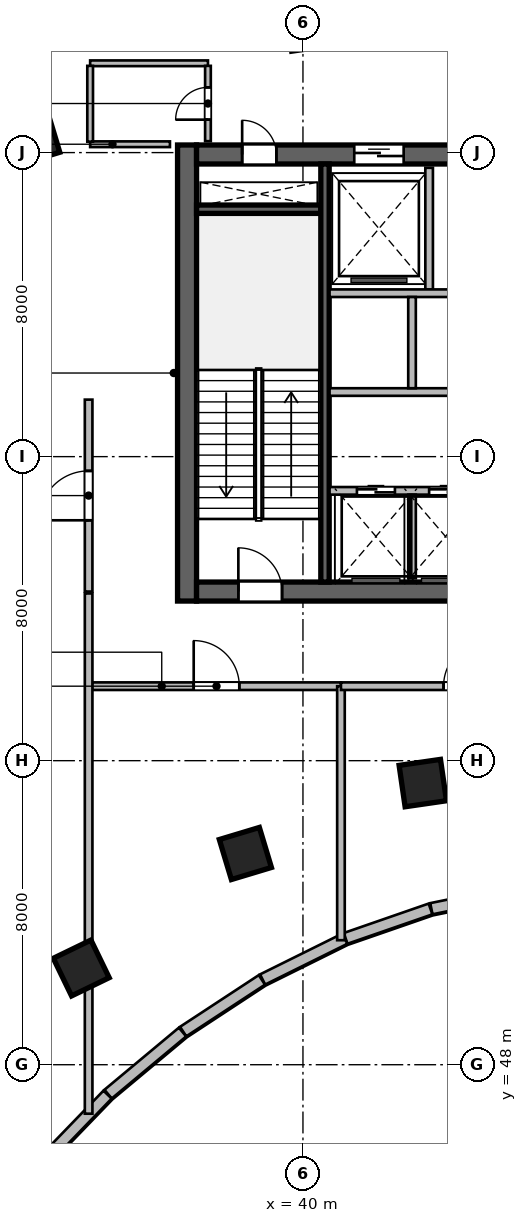
"""IFC4 building model, lengths in metres.
Left out: names, types, materials, properties, quantities, classifications, styles, units other than length and angle.
Written with IfcOpenShell. Run it as: python <this file> out.ifc"""

import sys

from ifc_helpers import new_model, si_unit, direction, frame, frame_2d, origin, origin_2d, place, context, subcontext, project, spatial, rectangle, extrude, source, transform, mapped, element, fill, save


model = new_model("IFC4")
c1 = context("Model", 3, precision=1e-05, world=origin(), true_north=direction((0.0, 1.0)))
c2 = subcontext(c1, "Body", "Model", "MODEL_VIEW")
j1 = project(units=[si_unit("LENGTHUNIT", "METRE"), si_unit("PLANEANGLEUNIT", "RADIAN")], contexts=[c1])
p1 = place(None, origin())
s1 = spatial("IfcSite", under=j1, at=p1, CompositionType="ELEMENT")
p2 = place(p1, origin())
s2 = spatial("IfcBuilding", under=s1, at=p2, CompositionType="ELEMENT")
p3 = place(p2, frame((0.0, 0.0, 85.8)))
s3 = spatial("IfcBuildingStorey", under=s2, at=p3, CompositionType="ELEMENT", Elevation=85.8)
m1 = source(origin(), c2, "Body", "SweptSolid", [
    extrude(rectangle(XDim=12.0, YDim=0.5, at=frame_2d((6.0, 0.0))), origin(), (0.0, 0.0, 1.0), 5.4),
])
p4 = place(p3, frame((36.95, 60.2, 0.0), z_axis=(0.0, 0.0, 1.0), x_axis=(0.0, 1.0, 0.0)))
e1 = element("IfcWall", 1, at=p4, inside=s3, PredefinedType="SHEAR", context=c2, shape_type="MappedRepresentation", body=[
    mapped(m1, transform((0.0, 0.0, 0.0), scale=1.0)),
])
m2 = source(origin(), c2, "Body", "SweptSolid", [
    extrude(rectangle(XDim=21.6, YDim=0.5, at=frame_2d((10.8, 0.0))), origin(), (0.0, 0.0, 1.0), 5.4),
])
p5 = place(p3, frame((37.2, 60.45, 0.0), z_axis=(0.0, 0.0, 1.0), x_axis=(1.0, 0.0, 0.0)))
e2 = element("IfcWall", 2, at=p5, inside=s3, PredefinedType="SHEAR", context=c2, shape_type="MappedRepresentation", body=[
    mapped(m2, transform((0.0, 0.0, 0.0), scale=1.0)),
])
p6 = place(p5, frame((1.1, 0.0, 0.0)))
e3 = element("IfcOpeningElement", 3, at=p6, cuts=e2, PredefinedType="OPENING", context=c2, shape_type="SweptSolid", body=[
    extrude(rectangle(XDim=1.15, YDim=2.15, at=frame_2d((0.575, 1.075))), frame((0.0, 0.26, 0.0), z_axis=(0.0, -1.0, 0.0), x_axis=(1.0, 0.0, 0.0)), (0.0, 0.0, 1.0), 0.52),
])
p7 = place(p5, frame((19.5, 0.0, 0.0)))
e4 = element("IfcOpeningElement", 4, at=p7, cuts=e2, PredefinedType="OPENING", context=c2, shape_type="SweptSolid", body=[
    extrude(rectangle(XDim=0.9, YDim=2.1, at=frame_2d((0.45, 1.05))), frame((0.0, 0.26, 0.0), z_axis=(0.0, -1.0, 0.0), x_axis=(1.0, 0.0, 0.0)), (0.0, 0.0, 1.0), 0.52),
])
p8 = place(p5, frame((12.02, 0.0, 0.0)))
e5 = element("IfcOpeningElement", 5, at=p8, cuts=e2, PredefinedType="OPENING", context=c2, shape_type="SweptSolid", body=[
    extrude(rectangle(XDim=1.6, YDim=2.15, at=frame_2d((0.8, 1.075))), frame((0.0, 0.26, 0.0), z_axis=(0.0, -1.0, 0.0), x_axis=(1.0, 0.0, 0.0)), (0.0, 0.0, 1.0), 0.52),
])
p9 = place(p3, frame((37.2, 71.95, 0.0), z_axis=(0.0, 0.0, 1.0), x_axis=(1.0, 0.0, 0.0)))
e6 = element("IfcWall", 6, at=p9, inside=s3, PredefinedType="SHEAR", context=c2, shape_type="MappedRepresentation", body=[
    mapped(m2, transform((0.0, 0.0, 0.0), scale=1.0)),
])
p10 = place(p9, frame((1.2, 0.0, 0.0)))
e7 = element("IfcOpeningElement", 7, at=p10, cuts=e6, PredefinedType="OPENING", context=c2, shape_type="SweptSolid", body=[
    extrude(rectangle(XDim=0.9, YDim=2.1, at=frame_2d((0.45, 1.05))), frame((0.0, 0.26, 0.0), z_axis=(0.0, -1.0, 0.0), x_axis=(1.0, 0.0, 0.0)), (0.0, 0.0, 1.0), 0.52),
])
p11 = place(p9, frame((14.7, 0.0, 0.0)))
e8 = element("IfcOpeningElement", 8, at=p11, cuts=e6, PredefinedType="OPENING", context=c2, shape_type="SweptSolid", body=[
    extrude(rectangle(XDim=1.2, YDim=2.15, at=frame_2d((0.6, 1.075))), frame((0.0, 0.26, 0.0), z_axis=(0.0, -1.0, 0.0), x_axis=(1.0, 0.0, 0.0)), (0.0, 0.0, 1.0), 0.52),
])
p12 = place(p9, frame((4.15, 0.0, 0.0)))
e9 = element("IfcOpeningElement", 9, at=p12, cuts=e6, PredefinedType="OPENING", context=c2, shape_type="SweptSolid", body=[
    extrude(rectangle(XDim=1.3, YDim=2.15, at=frame_2d((0.65, 1.075))), frame((0.0, 0.26, 0.0), z_axis=(0.0, -1.0, 0.0), x_axis=(1.0, 0.0, 0.0)), (0.0, 0.0, 1.0), 0.52),
])
p13 = place(p9, frame((7.25, 0.0, 0.0)))
e10 = element("IfcOpeningElement", 10, at=p13, cuts=e6, PredefinedType="OPENING", context=c2, shape_type="SweptSolid", body=[
    extrude(rectangle(XDim=0.9, YDim=2.1, at=frame_2d((0.45, 1.05))), frame((0.0, 0.26, 0.0), z_axis=(0.0, -1.0, 0.0), x_axis=(1.0, 0.0, 0.0)), (0.0, 0.0, 1.0), 0.52),
])
m3 = source(origin(), c2, "Body", "SweptSolid", [
    extrude(rectangle(XDim=3.27, YDim=0.22, at=frame_2d((1.635, 0.0))), origin(), (0.0, 0.0, 1.0), 5.4),
])
p14 = place(p3, frame((37.2, 70.51, 0.0), z_axis=(0.0, 0.0, 1.0), x_axis=(1.0, 0.0, 0.0)))
e11 = element("IfcWall", 11, at=p14, inside=s3, PredefinedType="SHEAR", context=c2, shape_type="MappedRepresentation", body=[
    mapped(m3, transform((0.0, 0.0, 0.0), scale=1.0)),
])
m4 = source(origin(), c2, "Body", "SweptSolid", [
    extrude(rectangle(XDim=11.0, YDim=0.22, at=frame_2d((5.5, 0.0))), origin(), (0.0, 0.0, 1.0), 5.4),
])
p15 = place(p3, frame((40.58, 60.7, 0.0), z_axis=(0.0, 0.0, 1.0), x_axis=(0.0, 1.0, 0.0)))
e12 = element("IfcWall", 12, at=p15, inside=s3, PredefinedType="SHEAR", context=c2, shape_type="MappedRepresentation", body=[
    mapped(m4, transform((0.0, 0.0, 0.0), scale=1.0)),
])
m5 = source(origin(), c2, "Body", "SweptSolid", [
    extrude(rectangle(XDim=1.1, YDim=1.1, at=origin_2d()), origin(), (0.0, 0.0, 1.0), 5.4),
])
for number, where, z_axis, x_axis in (
    (13, (34.166, 50.545, 0.0), (0.0, 0.0, 1.0), (-0.436, 0.9, 0.0)),
    (14, (38.485, 53.558, 0.0), (0.0, 0.0, 1.0), (-0.289, 0.957, 0.0)),
):
    element("IfcColumn", number, at=place(p3, frame(where, z_axis=z_axis, x_axis=x_axis)), inside=s3, PredefinedType="COLUMN", context=c2, shape_type="MappedRepresentation", body=[
        mapped(m5, transform((0.0, 0.0, 0.0), scale=1.0)),
    ])
m6 = source(origin(), c2, "Body", "SweptSolid", [
    extrude(rectangle(XDim=1.3, YDim=1.3, at=origin_2d()), origin(), (0.0, 0.0, 1.0), 5.4),
])
p16 = place(p3, frame((32.791, 72.442, 0.0), z_axis=(0.0, 0.0, 1.0), x_axis=(-0.288697611798, 0.957420330337, 0.0)))
e15 = element("IfcColumn", 15, at=p16, inside=s3, PredefinedType="COLUMN", context=c2, shape_type="MappedRepresentation", body=[
    mapped(m6, transform((0.0, 0.0, 0.0), scale=1.0)),
])
p17 = place(p3, frame((43.154, 55.411, 0.0), z_axis=(0.0, 0.0, 1.0), x_axis=(-0.143492621991, 0.98965138682, 0.0)))
e16 = element("IfcColumn", 16, at=p17, inside=s3, PredefinedType="COLUMN", context=c2, shape_type="MappedRepresentation", body=[
    mapped(m5, transform((0.0, 0.0, 0.0), scale=1.0)),
])
m7 = source(origin(), c2, "Body", "SweptSolid", [
    extrude(rectangle(XDim=2.328, YDim=0.3, at=frame_2d((1.164, 0.0))), origin(), (0.0, 0.0, 1.0), 5.15),
])
p18 = place(p3, frame((45.66, 52.572, 0.0), z_axis=(0.0, 0.0, 1.0), x_axis=(-0.979604817867, -0.200933821971, 0.0)))
e17 = element("IfcWall", 17, at=p18, inside=s3, PredefinedType="SOLIDWALL", context=c2, shape_type="MappedRepresentation", body=[
    mapped(m7, transform((0.0, 0.0, 0.0), scale=1.0)),
])
m8 = source(origin(), c2, "Body", "SweptSolid", [
    extrude(rectangle(XDim=2.364, YDim=0.3, at=frame_2d((1.182, 0.0))), origin(), (0.0, 0.0, 1.0), 5.15),
])
p19 = place(p3, frame((43.356, 52.098, 0.0), z_axis=(0.0, 0.0, 1.0), x_axis=(-0.944877958415, -0.327422729359, 0.0)))
e18 = element("IfcWall", 18, at=p19, inside=s3, PredefinedType="SOLIDWALL", context=c2, shape_type="MappedRepresentation", body=[
    mapped(m8, transform((0.0, 0.0, 0.0), scale=1.0)),
])
m9 = source(origin(), c2, "Body", "SweptSolid", [
    extrude(rectangle(XDim=2.415, YDim=0.3, at=frame_2d((1.208, 0.0))), origin(), (0.0, 0.0, 1.0), 5.15),
])
p20 = place(p3, frame((41.102, 51.315, 0.0), z_axis=(0.0, 0.0, 1.0), x_axis=(-0.895978588606, -0.444097251466, 0.0)))
e19 = element("IfcWall", 19, at=p20, inside=s3, PredefinedType="SOLIDWALL", context=c2, shape_type="MappedRepresentation", body=[
    mapped(m9, transform((0.0, 0.0, 0.0), scale=1.0)),
])
m10 = source(origin(), c2, "Body", "SweptSolid", [
    extrude(rectangle(XDim=2.478, YDim=0.3, at=frame_2d((1.239, 0.0))), origin(), (0.0, 0.0, 1.0), 5.15),
])
p21 = place(p3, frame((38.919, 50.232, 0.0), z_axis=(0.0, 0.0, 1.0), x_axis=(-0.835954701048, -0.548798449156, 0.0)))
e20 = element("IfcWall", 20, at=p21, inside=s3, PredefinedType="SOLIDWALL", context=c2, shape_type="MappedRepresentation", body=[
    mapped(m10, transform((0.0, 0.0, 0.0), scale=1.0)),
])
m11 = source(origin(), c2, "Body", "SweptSolid", [
    extrude(rectangle(XDim=2.551, YDim=0.3, at=frame_2d((1.275, 0.0))), origin(), (0.0, 0.0, 1.0), 5.15),
])
p22 = place(p3, frame((36.831, 48.86, 0.0), z_axis=(0.0, 0.0, 1.0), x_axis=(-0.767977995995, -0.640476227247, 0.0)))
e21 = element("IfcWall", 21, at=p22, inside=s3, PredefinedType="SOLIDWALL", context=c2, shape_type="MappedRepresentation", body=[
    mapped(m11, transform((0.0, 0.0, 0.0), scale=1.0)),
])
m12 = source(origin(), c2, "Body", "SweptSolid", [
    extrude(rectangle(XDim=2.628, YDim=0.3, at=frame_2d((1.314, 0.0))), origin(), (0.0, 0.0, 1.0), 5.15),
])
p23 = place(p3, frame((34.858, 47.213, 0.0), z_axis=(0.0, 0.0, 1.0), x_axis=(-0.694596171565, -0.719399859917, 0.0)))
e22 = element("IfcWall", 22, at=p23, inside=s3, PredefinedType="SOLIDWALL", context=c2, shape_type="MappedRepresentation", body=[
    mapped(m12, transform((0.0, 0.0, 0.0), scale=1.0)),
])
m13 = source(origin(), c2, "Body", "SweptSolid", [
    extrude(rectangle(XDim=3.2, YDim=0.2, at=frame_2d((1.6, 0.0))), origin(), (0.0, 0.0, 1.0), 5.15),
])
p24 = place(p3, frame((43.32, 68.4, 0.0), z_axis=(0.0, 0.0, 1.0), x_axis=(0.0, 1.0, 0.0)))
e23 = element("IfcWall", 23, at=p24, inside=s3, PredefinedType="SOLIDWALL", context=c2, shape_type="MappedRepresentation", body=[
    mapped(m13, transform((0.0, 0.0, 0.0), scale=1.0)),
])
m14 = source(origin(), c2, "Body", "SweptSolid", [
    extrude(rectangle(XDim=8.8, YDim=0.2, at=frame_2d((4.4, 0.0))), origin(), (0.0, 0.0, 1.0), 5.15),
])
p25 = place(p3, frame((40.7, 68.3, 0.0), z_axis=(0.0, 0.0, 1.0), x_axis=(1.0, 0.0, 0.0)))
e24 = element("IfcWall", 24, at=p25, inside=s3, PredefinedType="SOLIDWALL", context=c2, shape_type="MappedRepresentation", body=[
    mapped(m14, transform((0.0, 0.0, 0.0), scale=1.0)),
])
m15 = source(origin(), c2, "Body", "SweptSolid", [
    extrude(rectangle(XDim=8.02, YDim=0.2, at=frame_2d((4.01, 0.0))), origin(), (0.0, 0.0, 1.0), 5.15),
])
p26 = place(p3, frame((40.7, 63.1, 0.0), z_axis=(0.0, 0.0, 1.0), x_axis=(1.0, 0.0, 0.0)))
e25 = element("IfcWall", 25, at=p26, inside=s3, PredefinedType="SOLIDWALL", context=c2, shape_type="MappedRepresentation", body=[
    mapped(m15, transform((0.0, 0.0, 0.0), scale=1.0)),
])
p27 = place(p26, frame((0.72, 0.0, 0.0)))
e26 = element("IfcOpeningElement", 26, at=p27, cuts=e25, PredefinedType="OPENING", context=c2, shape_type="SweptSolid", body=[
    extrude(rectangle(XDim=1.0, YDim=2.15, at=frame_2d((0.5, 1.075))), frame((0.0, 0.11, 0.0), z_axis=(0.0, -1.0, 0.0), x_axis=(1.0, 0.0, 0.0)), (0.0, 0.0, 1.0), 0.22),
])
p28 = place(p26, frame((2.62, 0.0, 0.0)))
e27 = element("IfcOpeningElement", 27, at=p28, cuts=e25, PredefinedType="OPENING", context=c2, shape_type="SweptSolid", body=[
    extrude(rectangle(XDim=1.0, YDim=2.15, at=frame_2d((0.5, 1.075))), frame((0.0, 0.11, 0.0), z_axis=(0.0, -1.0, 0.0), x_axis=(1.0, 0.0, 0.0)), (0.0, 0.0, 1.0), 0.22),
])
p29 = place(p26, frame((4.55, 0.0, 0.0)))
e28 = element("IfcOpeningElement", 28, at=p29, cuts=e25, PredefinedType="OPENING", context=c2, shape_type="SweptSolid", body=[
    extrude(rectangle(XDim=1.0, YDim=2.15, at=frame_2d((0.5, 1.075))), frame((0.0, 0.11, 0.0), z_axis=(0.0, -1.0, 0.0), x_axis=(1.0, 0.0, 0.0)), (0.0, 0.0, 1.0), 0.22),
])
p30 = place(p26, frame((6.55, 0.0, 0.0)))
e29 = element("IfcOpeningElement", 29, at=p30, cuts=e25, PredefinedType="OPENING", context=c2, shape_type="SweptSolid", body=[
    extrude(rectangle(XDim=1.0, YDim=2.15, at=frame_2d((0.5, 1.075))), frame((0.0, 0.11, 0.0), z_axis=(0.0, -1.0, 0.0), x_axis=(1.0, 0.0, 0.0)), (0.0, 0.0, 1.0), 0.22),
])
m16 = source(origin(), c2, "Body", "SweptSolid", [
    extrude(rectangle(XDim=2.2, YDim=0.2, at=frame_2d((1.1, 0.0))), origin(), (0.0, 0.0, 1.0), 5.15),
])
p31 = place(p3, frame((42.87, 60.8, 0.0), z_axis=(0.0, 0.0, 1.0), x_axis=(0.0, 1.0, 0.0)))
e30 = element("IfcWall", 30, at=p31, inside=s3, PredefinedType="SOLIDWALL", context=c2, shape_type="MappedRepresentation", body=[
    mapped(m16, transform((0.0, 0.0, 0.0), scale=1.0)),
])
p32 = place(p3, frame((40.7, 65.7, 0.0), z_axis=(0.0, 0.0, 1.0), x_axis=(1.0, 0.0, 0.0)))
e31 = element("IfcWall", 31, at=p32, inside=s3, PredefinedType="SOLIDWALL", context=c2, shape_type="MappedRepresentation", body=[
    mapped(m14, transform((0.0, 0.0, 0.0), scale=1.0)),
])
m17 = source(origin(), c2, "Body", "SweptSolid", [
    extrude(rectangle(XDim=2.4, YDim=0.2, at=frame_2d((1.2, 0.0))), origin(), (0.0, 0.0, 1.0), 5.15),
])
p33 = place(p3, frame((42.87, 65.8, 0.0), z_axis=(0.0, 0.0, 1.0), x_axis=(0.0, 1.0, 0.0)))
e32 = element("IfcWall", 32, at=p33, inside=s3, PredefinedType="SOLIDWALL", context=c2, shape_type="MappedRepresentation", body=[
    mapped(m17, transform((0.0, 0.0, 0.0), scale=1.0)),
])
m18 = source(origin(), c2, "Body", "SweptSolid", [
    extrude(rectangle(XDim=2.1, YDim=0.15, at=frame_2d((1.05, 0.0))), origin(), (0.0, 0.0, 1.0), 5.15),
])
p34 = place(p3, frame((34.4, 72.22, 0.0), z_axis=(0.0, 0.0, 1.0), x_axis=(1.0, 0.0, 0.0)))
e33 = element("IfcWall", 33, at=p34, inside=s3, PredefinedType="PARTITIONING", context=c2, shape_type="MappedRepresentation", body=[
    mapped(m18, transform((0.0, 0.0, 0.0), scale=1.0)),
])
m19 = source(origin(), c2, "Body", "SweptSolid", [
    extrude(rectangle(XDim=3.1, YDim=0.15, at=frame_2d((1.55, 0.0))), origin(), (0.0, 0.0, 1.0), 2.425),
])
p35 = place(p3, frame((34.4, 74.35, 0.0), z_axis=(0.0, 0.0, 1.0), x_axis=(1.0, 0.0, 0.0)))
e34 = element("IfcWall", 34, at=p35, inside=s3, PredefinedType="PARTITIONING", context=c2, shape_type="MappedRepresentation", body=[
    mapped(m19, transform((0.0, 0.0, 0.0), scale=1.0)),
])
m20 = source(origin(), c2, "Body", "SweptSolid", [
    extrude(rectangle(XDim=1.995, YDim=0.15, at=frame_2d((0.998, 0.0))), origin(), (0.0, 0.0, 1.0), 5.15),
])
p36 = place(p3, frame((34.4, 72.288, 0.0), z_axis=(0.0, 0.0, 1.0), x_axis=(0.0, 1.0, 0.0)))
e35 = element("IfcWall", 35, at=p36, inside=s3, PredefinedType="PARTITIONING", context=c2, shape_type="MappedRepresentation", body=[
    mapped(m20, transform((0.0, 0.0, 0.0), scale=1.0)),
])
m21 = source(origin(), c2, "Body", "SweptSolid", [
    extrude(rectangle(XDim=1.982, YDim=0.15, at=frame_2d((0.991, 0.0))), origin(), (0.0, 0.0, 1.0), 5.15),
])
p37 = place(p3, frame((37.5, 72.3, 0.0), z_axis=(0.0, 0.0, 1.0), x_axis=(0.0, 1.0, 0.0)))
e36 = element("IfcWall", 36, at=p37, inside=s3, PredefinedType="PARTITIONING", context=c2, shape_type="MappedRepresentation", body=[
    mapped(m21, transform((0.0, 0.0, 0.0), scale=1.0)),
])
p38 = place(p37, frame((0.566, 0.0, 0.0)))
e37 = element("IfcOpeningElement", 37, at=p38, cuts=e36, PredefinedType="OPENING", context=c2, shape_type="SweptSolid", body=[
    extrude(rectangle(XDim=0.85, YDim=2.1, at=frame_2d((0.425, 1.05))), frame((0.0, 0.085, 0.0), z_axis=(0.0, -1.0, 0.0), x_axis=(1.0, 0.0, 0.0)), (0.0, 0.0, 1.0), 0.17),
])
m22 = source(origin(), c2, "Body", "SweptSolid", [
    extrude(rectangle(XDim=6.55, YDim=0.2, at=frame_2d((3.275, 0.0))), origin(), (0.0, 0.0, 1.0), 5.15),
])
p39 = place(p3, frame((34.45, 57.96, 0.0), z_axis=(0.0, 0.0, 1.0), x_axis=(1.0, 0.0, 0.0)))
e38 = element("IfcWall", 38, at=p39, inside=s3, PredefinedType="SOLIDWALL", context=c2, shape_type="MappedRepresentation", body=[
    mapped(m22, transform((0.0, 0.0, 0.0), scale=1.0)),
])
p40 = place(p39, frame((2.675, 0.0, 0.0)))
e39 = element("IfcOpeningElement", 39, at=p40, cuts=e38, PredefinedType="OPENING", context=c2, shape_type="SweptSolid", body=[
    extrude(rectangle(XDim=1.2, YDim=2.15, at=frame_2d((0.6, 1.075))), frame((0.0, 0.11, 0.0), z_axis=(0.0, -1.0, 0.0), x_axis=(1.0, 0.0, 0.0)), (0.0, 0.0, 1.0), 0.22),
])
m23 = source(origin(), c2, "Body", "SweptSolid", [
    extrude(rectangle(XDim=6.684, YDim=0.2, at=frame_2d((3.342, 0.0))), origin(), (0.0, 0.0, 1.0), 5.15),
])
p41 = place(p3, frame((41.0, 51.276, 0.0), z_axis=(0.0, 0.0, 1.0), x_axis=(0.0, 1.0, 0.0)))
e40 = element("IfcWall", 40, at=p41, inside=s3, PredefinedType="SOLIDWALL", context=c2, shape_type="MappedRepresentation", body=[
    mapped(m23, transform((0.0, 0.0, 0.0), scale=1.0)),
])
m24 = source(origin(), c2, "Body", "SweptSolid", [
    extrude(rectangle(XDim=6.6, YDim=0.2, at=frame_2d((3.3, 0.0))), origin(), (0.0, 0.0, 1.0), 4.717),
])
p42 = place(p3, frame((41.0, 57.96, 0.0), z_axis=(0.0, 0.0, 1.0), x_axis=(1.0, 0.0, 0.0)))
e41 = element("IfcWall", 41, at=p42, inside=s3, PredefinedType="SOLIDWALL", context=c2, shape_type="MappedRepresentation", body=[
    mapped(m24, transform((0.0, 0.0, 0.0), scale=1.0)),
])
p43 = place(p42, frame((2.7, 0.0, 0.0)))
e42 = element("IfcOpeningElement", 42, at=p43, cuts=e41, PredefinedType="OPENING", context=c2, shape_type="SweptSolid", body=[
    extrude(rectangle(XDim=1.2, YDim=2.15, at=frame_2d((0.6, 1.075))), frame((0.0, 0.11, 0.0), z_axis=(0.0, -1.0, 0.0), x_axis=(1.0, 0.0, 0.0)), (0.0, 0.0, 1.0), 0.22),
])
m25 = source(origin(), c2, "Body", "SweptSolid", [
    extrude(rectangle(XDim=13.689, YDim=0.2, at=frame_2d((6.844, 0.0))), origin(), (0.0, 0.0, 1.0), 5.15),
])
p44 = place(p3, frame((34.36, 46.711, 0.0), z_axis=(0.0, 0.0, 1.0), x_axis=(0.0, 1.0, 0.0)))
e43 = element("IfcWall", 43, at=p44, inside=s3, PredefinedType="SOLIDWALL", context=c2, shape_type="MappedRepresentation", body=[
    mapped(m25, transform((0.0, 0.0, 0.0), scale=1.0)),
])
m26 = source(origin(), c2, "Body", "SweptSolid", [
    extrude(rectangle(XDim=5.05, YDim=0.2, at=frame_2d((2.525, 0.0))), origin(), (0.0, 0.0, 1.0), 5.15),
])
p45 = place(p3, frame((34.36, 60.45, 0.0), z_axis=(0.0, 0.0, 1.0), x_axis=(0.0, 1.0, 0.0)))
e44 = element("IfcWall", 44, at=p45, inside=s3, PredefinedType="SOLIDWALL", context=c2, shape_type="MappedRepresentation", body=[
    mapped(m26, transform((0.0, 0.0, 0.0), scale=1.0)),
])
p46 = place(p45, frame((1.875, 0.0, 0.0)))
e45 = element("IfcOpeningElement", 45, at=p46, cuts=e44, PredefinedType="OPENING", context=c2, shape_type="SweptSolid", body=[
    extrude(rectangle(XDim=1.3, YDim=2.15, at=frame_2d((0.65, 1.075))), frame((0.0, 0.11, 0.0), z_axis=(0.0, -1.0, 0.0), x_axis=(1.0, 0.0, 0.0)), (0.0, 0.0, 1.0), 0.22),
])
m27 = source(origin(), c2, "Body", "SweptSolid", [
    extrude(rectangle(XDim=1.15, YDim=2.15, at=frame_2d((0.575, 1.075))), frame((0.0, 0.025, 0.0), z_axis=(0.0, -1.0, 0.0), x_axis=(1.0, 0.0, 0.0)), (0.0, 0.0, 1.0), 0.05),
])
p47 = place(p6, origin())
e46 = element("IfcDoor", 46, at=p47, inside=s3, OperationType="SINGLE_SWING_LEFT", PredefinedType="DOOR", context=c2, shape_type="MappedRepresentation", body=[
    mapped(m27, transform((0.0, 0.0, 0.0), scale=1.0)),
])
fill(e3, e46)
m28 = source(origin(), c2, "Body", "SweptSolid", [
    extrude(rectangle(XDim=0.9, YDim=2.1, at=frame_2d((0.45, 1.05))), frame((0.0, 0.025, 0.0), z_axis=(0.0, -1.0, 0.0), x_axis=(1.0, 0.0, 0.0)), (0.0, 0.0, 1.0), 0.05),
])
p48 = place(p10, origin())
e47 = element("IfcDoor", 47, at=p48, inside=s3, OperationType="SINGLE_SWING_LEFT", PredefinedType="DOOR", context=c2, shape_type="MappedRepresentation", body=[
    mapped(m28, transform((0.0, 0.0, 0.0), scale=1.0)),
])
fill(e7, e47)
m29 = source(origin(), c2, "Body", "SweptSolid", [
    extrude(rectangle(XDim=1.3, YDim=2.15, at=frame_2d((0.65, 1.075))), frame((0.0, 0.025, 0.0), z_axis=(0.0, -1.0, 0.0), x_axis=(1.0, 0.0, 0.0)), (0.0, 0.0, 1.0), 0.05),
])
p49 = place(p12, origin())
e48 = element("IfcDoor", 48, at=p49, inside=s3, OperationType="DOUBLE_DOOR_SLIDING", PredefinedType="DOOR", context=c2, shape_type="MappedRepresentation", body=[
    mapped(m29, transform((0.0, 0.0, 0.0), scale=1.0)),
])
fill(e9, e48)
m30 = source(origin(), c2, "Body", "SweptSolid", [
    extrude(rectangle(XDim=1.0, YDim=2.15, at=frame_2d((0.5, 1.075))), frame((0.0, 0.025, 0.0), z_axis=(0.0, -1.0, 0.0), x_axis=(1.0, 0.0, 0.0)), (0.0, 0.0, 1.0), 0.05),
])
p50 = place(p27, origin())
e49 = element("IfcDoor", 49, at=p50, inside=s3, OperationType="DOUBLE_DOOR_SLIDING", PredefinedType="DOOR", context=c2, shape_type="MappedRepresentation", body=[
    mapped(m30, transform((0.0, 0.0, 0.0), scale=1.0)),
])
fill(e26, e49)
p51 = place(p28, origin())
e50 = element("IfcDoor", 50, at=p51, inside=s3, OperationType="DOUBLE_DOOR_SLIDING", PredefinedType="DOOR", context=c2, shape_type="MappedRepresentation", body=[
    mapped(m30, transform((0.0, 0.0, 0.0), scale=1.0)),
])
fill(e27, e50)
m31 = source(origin(), c2, "Body", "SweptSolid", [
    extrude(rectangle(XDim=0.85, YDim=2.1, at=frame_2d((0.425, 1.05))), frame((0.0, 0.025, 0.0), z_axis=(0.0, -1.0, 0.0), x_axis=(1.0, 0.0, 0.0)), (0.0, 0.0, 1.0), 0.05),
])
p52 = place(p38, origin())
e51 = element("IfcDoor", 51, at=p52, inside=s3, OperationType="SINGLE_SWING_LEFT", PredefinedType="DOOR", context=c2, shape_type="MappedRepresentation", body=[
    mapped(m31, transform((0.0, 0.0, 0.0), scale=1.0)),
])
fill(e37, e51)
m32 = source(origin(), c2, "Body", "SweptSolid", [
    extrude(rectangle(XDim=1.2, YDim=2.15, at=frame_2d((0.6, 1.075))), frame((0.0, 0.025, 0.0), z_axis=(0.0, -1.0, 0.0), x_axis=(1.0, 0.0, 0.0)), (0.0, 0.0, 1.0), 0.05),
])
p53 = place(p40, origin())
e52 = element("IfcDoor", 52, at=p53, inside=s3, OperationType="SINGLE_SWING_LEFT", PredefinedType="DOOR", context=c2, shape_type="MappedRepresentation", body=[
    mapped(m32, transform((0.0, 0.0, 0.0), scale=1.0)),
])
fill(e39, e52)
p54 = place(p43, origin())
e53 = element("IfcDoor", 53, at=p54, inside=s3, OperationType="SINGLE_SWING_RIGHT", PredefinedType="DOOR", context=c2, shape_type="MappedRepresentation", body=[
    mapped(m32, transform((0.0, 0.0, 0.0), scale=1.0)),
])
fill(e42, e53)
m33 = source(origin(), c2, "Body", "SweptSolid", [
    extrude(rectangle(XDim=1.3, YDim=2.15, at=frame_2d((0.65, 1.075))), frame((0.0, 0.025, 0.0), z_axis=(0.0, -1.0, 0.0), x_axis=(1.0, 0.0, 0.0)), (0.0, 0.0, 1.0), 0.05),
])
p55 = place(p46, origin())
e54 = element("IfcDoor", 54, at=p55, inside=s3, OperationType="SINGLE_SWING_LEFT", PredefinedType="DOOR", context=c2, shape_type="MappedRepresentation", body=[
    mapped(m33, transform((0.0, 0.0, 0.0), scale=1.0)),
])
fill(e45, e54)
save(model, sys.argv[1])
